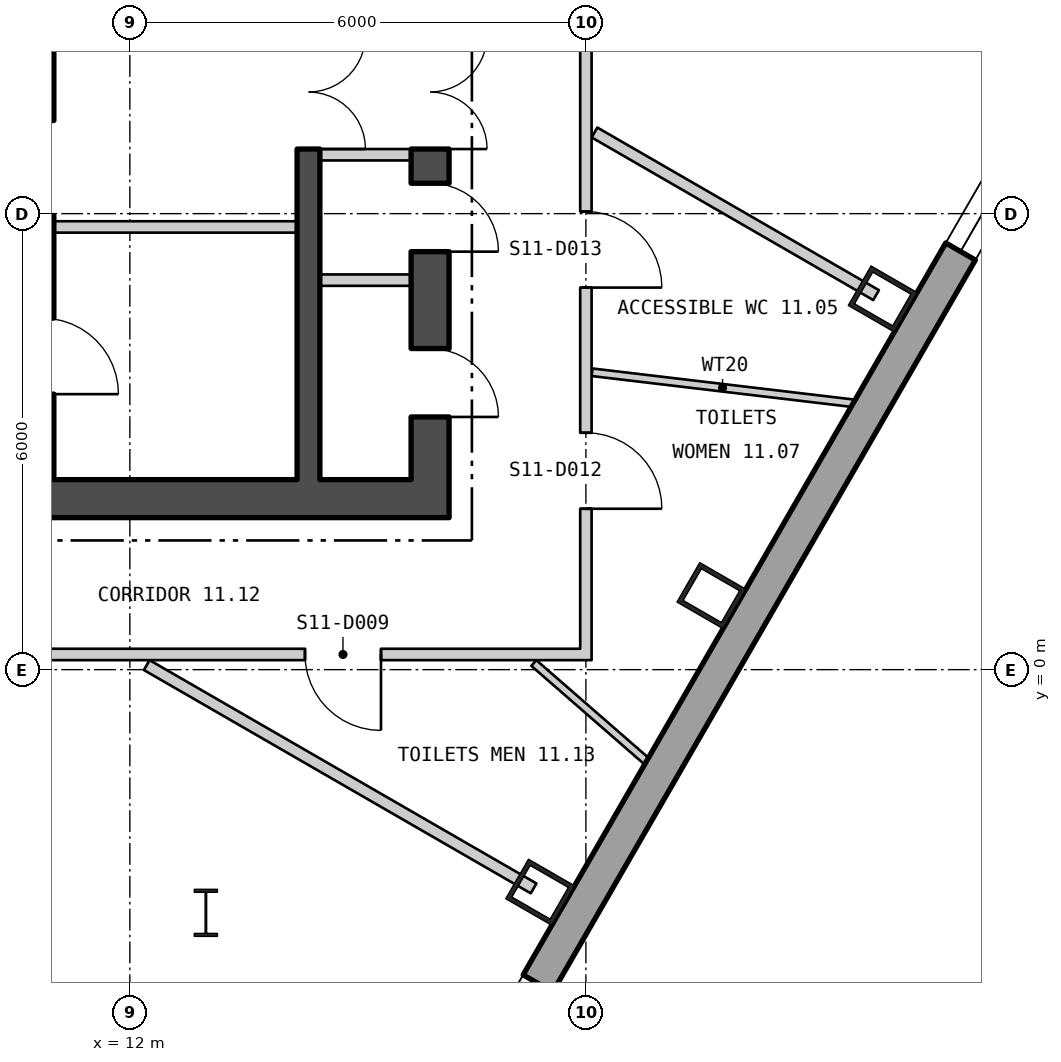
"""IFC4 building model, lengths in metres.
Left out: names, types, materials, properties, quantities, classifications, styles, units other than length and angle.
Written with IfcOpenShell. Run it as: python <this file> out.ifc"""

import sys

from ifc_helpers import new_model, si_unit, direction, frame, frame_2d, origin, origin_2d, place, context, subcontext, project, spatial, polyline, rectangle, hollow_rectangle, i_section, outline, extrude, element, fill, save


model = new_model("IFC4")
c1 = context("Model", 3, precision=1e-05, world=origin(), true_north=direction((0.0, 1.0)))
c2 = subcontext(c1, "Body", "Model", "MODEL_VIEW")
j1 = project(units=[si_unit("LENGTHUNIT", "METRE"), si_unit("PLANEANGLEUNIT", "RADIAN")], contexts=[c1])
p1 = place(None, origin())
s1 = spatial("IfcSite", under=j1, at=p1, CompositionType="ELEMENT")
p2 = place(p1, origin())
s2 = spatial("IfcBuilding", under=s1, at=p2, CompositionType="ELEMENT")
p3 = place(p2, frame((0.0, 0.0, 151.5)))
s3 = spatial("IfcBuildingStorey", under=s2, at=p3, CompositionType="ELEMENT", Elevation=151.5)
for number, where, z_axis, x_axis in (
    (1, (17.398, -2.929, 0.0), (0.0, 0.0, 1.0), (0.5, 0.866, 0.0)),
    (2, (19.651, 0.974, 0.0), (0.0, 0.0, 1.0), (0.5, 0.866, 0.0)),
    (3, (21.905, 4.877, 0.0), (0.0, 0.0, 1.0), (0.5, 0.866, 0.0)),
):
    element("IfcColumn", number, at=place(p3, frame(where, z_axis=z_axis, x_axis=x_axis)), inside=s3, PredefinedType="COLUMN", context=c2, shape_type="SweptSolid", body=[
        extrude(hollow_rectangle(XDim=0.6, YDim=0.7, WallThickness=0.06, at=origin_2d()), origin(), (0.0, 0.0, 1.0), 3.9),
    ])
p4 = place(p3, frame((13.0, -3.2, 0.0), z_axis=(0.0, 0.0, 1.0), x_axis=(1.0, 0.0, 0.0)))
e4 = element("IfcColumn", 4, at=p4, inside=s3, PredefinedType="COLUMN", context=c2, shape_type="SweptSolid", body=[
    extrude(i_section(OverallWidth=0.305, OverallDepth=0.62, WebThickness=0.021, FlangeThickness=0.04, at=origin_2d()), origin(), (0.0, 0.0, 1.0), 3.9),
])
p5 = place(p3, frame((4.21, -26.921, -0.18), z_axis=(0.0, 0.0, 1.0), x_axis=(0.500000141277, 0.866025322218, 0.0)))
e5 = element("IfcWall", 5, at=p5, inside=s3, PredefinedType="SOLIDWALL", context=c2, shape_type="SweptSolid", body=[
    extrude(outline(polyline([(-0.13, -0.225), (45.86, -0.225), (45.6, 0.225), (0.13, 0.225), (-0.13, -0.225)])), origin(), (0.0, 0.0, 1.0), 3.68),
])
p6 = place(p5, frame((1.424, 0.0, 1.08)))
e6 = element("IfcOpeningElement", 6, at=p6, cuts=e5, PredefinedType="OPENING", context=c2, shape_type="SweptSolid", body=[
    extrude(rectangle(XDim=2.4, YDim=2.0, at=frame_2d((1.2, 1.0))), frame((0.0, 0.235, 0.0), z_axis=(0.0, -1.0, 0.0), x_axis=(1.0, 0.0, 0.0)), (0.0, 0.0, 1.0), 0.47),
])
p7 = place(p5, frame((5.892, 0.0, 1.08)))
e7 = element("IfcOpeningElement", 7, at=p7, cuts=e5, PredefinedType="OPENING", context=c2, shape_type="SweptSolid", body=[
    extrude(rectangle(XDim=2.4, YDim=2.0, at=frame_2d((1.2, 1.0))), frame((0.0, 0.235, 0.0), z_axis=(0.0, -1.0, 0.0), x_axis=(1.0, 0.0, 0.0)), (0.0, 0.0, 1.0), 0.47),
])
p8 = place(p5, frame((10.399, 0.0, 1.08)))
e8 = element("IfcOpeningElement", 8, at=p8, cuts=e5, PredefinedType="OPENING", context=c2, shape_type="SweptSolid", body=[
    extrude(rectangle(XDim=2.4, YDim=2.0, at=frame_2d((1.2, 1.0))), frame((0.0, 0.235, 0.0), z_axis=(0.0, -1.0, 0.0), x_axis=(1.0, 0.0, 0.0)), (0.0, 0.0, 1.0), 0.47),
])
p9 = place(p5, frame((14.905, 0.0, 1.08)))
e9 = element("IfcOpeningElement", 9, at=p9, cuts=e5, PredefinedType="OPENING", context=c2, shape_type="SweptSolid", body=[
    extrude(rectangle(XDim=2.4, YDim=2.0, at=frame_2d((1.2, 1.0))), frame((0.0, 0.235, 0.0), z_axis=(0.0, -1.0, 0.0), x_axis=(1.0, 0.0, 0.0)), (0.0, 0.0, 1.0), 0.47),
])
p10 = place(p5, frame((19.412, 0.0, 1.08)))
e10 = element("IfcOpeningElement", 10, at=p10, cuts=e5, PredefinedType="OPENING", context=c2, shape_type="SweptSolid", body=[
    extrude(rectangle(XDim=2.4, YDim=2.0, at=frame_2d((1.2, 1.0))), frame((0.0, 0.235, 0.0), z_axis=(0.0, -1.0, 0.0), x_axis=(1.0, 0.0, 0.0)), (0.0, 0.0, 1.0), 0.47),
])
p11 = place(p5, frame((23.918, 0.0, 1.08)))
e11 = element("IfcOpeningElement", 11, at=p11, cuts=e5, PredefinedType="OPENING", context=c2, shape_type="SweptSolid", body=[
    extrude(rectangle(XDim=2.4, YDim=2.0, at=frame_2d((1.2, 1.0))), frame((0.0, 0.235, 0.0), z_axis=(0.0, -1.0, 0.0), x_axis=(1.0, 0.0, 0.0)), (0.0, 0.0, 1.0), 0.47),
])
p12 = place(p5, frame((37.438, 0.0, 1.08)))
e12 = element("IfcOpeningElement", 12, at=p12, cuts=e5, PredefinedType="OPENING", context=c2, shape_type="SweptSolid", body=[
    extrude(rectangle(XDim=2.4, YDim=2.0, at=frame_2d((1.2, 1.0))), frame((0.0, 0.235, 0.0), z_axis=(0.0, -1.0, 0.0), x_axis=(1.0, 0.0, 0.0)), (0.0, 0.0, 1.0), 0.47),
])
p13 = place(p5, frame((41.907, 0.0, 1.08)))
e13 = element("IfcOpeningElement", 13, at=p13, cuts=e5, PredefinedType="OPENING", context=c2, shape_type="SweptSolid", body=[
    extrude(rectangle(XDim=2.4, YDim=2.0, at=frame_2d((1.2, 1.0))), frame((0.0, 0.235, 0.0), z_axis=(0.0, -1.0, 0.0), x_axis=(1.0, 0.0, 0.0)), (0.0, 0.0, 1.0), 0.47),
])
p14 = place(p3, frame((-16.2, 2.25, 0.0), z_axis=(0.0, 0.0, 1.0), x_axis=(1.0, 0.0, 0.0)))
e14 = element("IfcWall", 14, at=p14, inside=s3, PredefinedType="SHEAR", context=c2, shape_type="SweptSolid", body=[
    extrude(rectangle(XDim=32.4, YDim=0.5, at=frame_2d((16.2, 0.0))), origin(), (0.0, 0.0, 1.0), 3.7),
])
p15 = place(p14, frame((10.7, 0.0, 0.0)))
e15 = element("IfcOpeningElement", 15, at=p15, cuts=e14, PredefinedType="OPENING", context=c2, shape_type="SweptSolid", body=[
    extrude(rectangle(XDim=1.8, YDim=2.4, at=frame_2d((0.9, 1.2))), frame((0.0, 0.26, 0.0), z_axis=(0.0, -1.0, 0.0), x_axis=(1.0, 0.0, 0.0)), (0.0, 0.0, 1.0), 0.52),
])
p16 = place(p14, frame((20.7, 0.0, 0.0)))
e16 = element("IfcOpeningElement", 16, at=p16, cuts=e14, PredefinedType="OPENING", context=c2, shape_type="SweptSolid", body=[
    extrude(rectangle(XDim=1.8, YDim=2.4, at=frame_2d((0.9, 1.2))), frame((0.0, 0.26, 0.0), z_axis=(0.0, -1.0, 0.0), x_axis=(1.0, 0.0, 0.0)), (0.0, 0.0, 1.0), 0.52),
])
p17 = place(p3, frame((15.95, 2.5, 0.0), z_axis=(0.0, 0.0, 1.0), x_axis=(0.0, 1.0, 0.0)))
e17 = element("IfcWall", 17, at=p17, inside=s3, PredefinedType="SHEAR", context=c2, shape_type="SweptSolid", body=[
    extrude(rectangle(XDim=15.0, YDim=0.5, at=frame_2d((7.5, 0.0))), origin(), (0.0, 0.0, 1.0), 3.7),
])
p18 = place(p17, frame((4.35, 0.0, 0.0)))
e18 = element("IfcOpeningElement", 18, at=p18, cuts=e17, PredefinedType="OPENING", context=c2, shape_type="SweptSolid", body=[
    extrude(rectangle(XDim=1.5, YDim=2.1, at=frame_2d((0.75, 1.05))), frame((0.0, 0.26, 0.0), z_axis=(0.0, -1.0, 0.0), x_axis=(1.0, 0.0, 0.0)), (0.0, 0.0, 1.0), 0.52),
])
p19 = place(p17, frame((0.825, 0.0, 0.0)))
e19 = element("IfcOpeningElement", 19, at=p19, cuts=e17, PredefinedType="OPENING", context=c2, shape_type="SweptSolid", body=[
    extrude(rectangle(XDim=0.9, YDim=2.1, at=frame_2d((0.45, 1.05))), frame((0.0, 0.26, 0.0), z_axis=(0.0, -1.0, 0.0), x_axis=(1.0, 0.0, 0.0)), (0.0, 0.0, 1.0), 0.52),
])
p20 = place(p17, frame((3.0, 0.0, 0.0)))
e20 = element("IfcOpeningElement", 20, at=p20, cuts=e17, PredefinedType="OPENING", context=c2, shape_type="SweptSolid", body=[
    extrude(rectangle(XDim=0.9, YDim=2.1, at=frame_2d((0.45, 1.05))), frame((0.0, 0.26, 0.0), z_axis=(0.0, -1.0, 0.0), x_axis=(1.0, 0.0, 0.0)), (0.0, 0.0, 1.0), 0.52),
])
p21 = place(p17, frame((6.59, 0.0, 0.0)))
e21 = element("IfcOpeningElement", 21, at=p21, cuts=e17, PredefinedType="OPENING", context=c2, shape_type="SweptSolid", body=[
    extrude(rectangle(XDim=1.0, YDim=2.1, at=frame_2d((0.5, 1.05))), frame((0.0, 0.26, 0.0), z_axis=(0.0, -1.0, 0.0), x_axis=(1.0, 0.0, 0.0)), (0.0, 0.0, 1.0), 0.52),
])
p22 = place(p17, frame((11.215, 0.0, 0.0)))
e22 = element("IfcOpeningElement", 22, at=p22, cuts=e17, PredefinedType="OPENING", context=c2, shape_type="SweptSolid", body=[
    extrude(rectangle(XDim=0.9, YDim=2.1, at=frame_2d((0.45, 1.05))), frame((0.0, 0.26, 0.0), z_axis=(0.0, -1.0, 0.0), x_axis=(1.0, 0.0, 0.0)), (0.0, 0.0, 1.0), 0.52),
])
p23 = place(p3, frame((10.85, 2.5, 0.0), z_axis=(0.0, 0.0, 1.0), x_axis=(0.0, 1.0, 0.0)))
e23 = element("IfcWall", 23, at=p23, inside=s3, PredefinedType="SHEAR", context=c2, shape_type="SweptSolid", body=[
    extrude(rectangle(XDim=15.0, YDim=0.3, at=frame_2d((7.5, 0.0))), origin(), (0.0, 0.0, 1.0), 3.7),
])
p24 = place(p23, frame((3.475, 0.0, 0.0)))
e24 = element("IfcOpeningElement", 24, at=p24, cuts=e23, PredefinedType="OPENING", context=c2, shape_type="SweptSolid", body=[
    extrude(rectangle(XDim=1.25, YDim=2.1, at=frame_2d((0.625, 1.05))), frame((0.0, 0.16, 0.0), z_axis=(0.0, -1.0, 0.0), x_axis=(1.0, 0.0, 0.0)), (0.0, 0.0, 1.0), 0.32),
])
p25 = place(p23, frame((1.125, 0.0, 0.0)))
e25 = element("IfcOpeningElement", 25, at=p25, cuts=e23, PredefinedType="OPENING", context=c2, shape_type="SweptSolid", body=[
    extrude(rectangle(XDim=1.0, YDim=2.1, at=frame_2d((0.5, 1.05))), frame((0.0, 0.16, 0.0), z_axis=(0.0, -1.0, 0.0), x_axis=(1.0, 0.0, 0.0)), (0.0, 0.0, 1.0), 0.32),
])
p26 = place(p3, frame((14.35, 2.5, 0.0), z_axis=(0.0, 0.0, 1.0), x_axis=(0.0, 1.0, 0.0)))
e26 = element("IfcWall", 26, at=p26, inside=s3, PredefinedType="SHEAR", context=c2, shape_type="SweptSolid", body=[
    extrude(rectangle(XDim=15.0, YDim=0.3, at=frame_2d((7.5, 0.0))), origin(), (0.0, 0.0, 1.0), 3.7),
])
p27 = place(p26, frame((4.35, 0.0, 0.0)))
e27 = element("IfcOpeningElement", 27, at=p27, cuts=e26, PredefinedType="OPENING", context=c2, shape_type="SweptSolid", body=[
    extrude(rectangle(XDim=1.5, YDim=2.1, at=frame_2d((0.75, 1.05))), frame((0.0, 0.16, 0.0), z_axis=(0.0, -1.0, 0.0), x_axis=(1.0, 0.0, 0.0)), (0.0, 0.0, 1.0), 0.32),
])
p28 = place(p3, frame((11.0, 5.825, 0.0), z_axis=(0.0, 0.0, 1.0), x_axis=(1.0, 0.0, 0.0)))
e28 = element("IfcWall", 28, at=p28, inside=s3, PredefinedType="PARTITIONING", context=c2, shape_type="SweptSolid", body=[
    extrude(rectangle(XDim=3.2, YDim=0.15, at=frame_2d((1.6, 0.0))), origin(), (0.0, 0.0, 1.0), 3.7),
])
for number, where, z_axis, x_axis in (
    (29, (14.5, 6.775, 0.0), (0.0, 0.0, 1.0), (1.0, 0.0, 0.0)),
    (30, (14.5, 5.125, 0.0), (0.0, 0.0, 1.0), (1.0, 0.0, 0.0)),
):
    element("IfcWall", number, at=place(p3, frame(where, z_axis=z_axis, x_axis=x_axis)), inside=s3, PredefinedType="PARTITIONING", context=c2, shape_type="SweptSolid", body=[
        extrude(rectangle(XDim=1.2, YDim=0.15, at=frame_2d((0.6, 0.0))), origin(), (0.0, 0.0, 1.0), 3.7),
    ])
p29 = place(p3, frame((7.17, 0.2, 0.0), z_axis=(0.0, 0.0, 1.0), x_axis=(1.0, 0.0, 0.0)))
e31 = element("IfcWall", 31, at=p29, inside=s3, PredefinedType="PARTITIONING", context=c2, shape_type="SweptSolid", body=[
    extrude(rectangle(XDim=10.755, YDim=0.15, at=frame_2d((5.378, 0.0))), origin(), (0.0, 0.0, 1.0), 3.7),
])
p30 = place(p29, frame((7.134, 0.0, 0.0)))
e32 = element("IfcOpeningElement", 32, at=p30, cuts=e31, PredefinedType="OPENING", context=c2, shape_type="SweptSolid", body=[
    extrude(rectangle(XDim=1.0, YDim=2.1, at=frame_2d((0.5, 1.05))), frame((0.0, 0.085, 0.0), z_axis=(0.0, -1.0, 0.0), x_axis=(1.0, 0.0, 0.0)), (0.0, 0.0, 1.0), 0.17),
])
p31 = place(p3, frame((12.222, 0.06, 0.0), z_axis=(0.0, 0.0, 1.0), x_axis=(0.866077922096, -0.499909024581, 0.0)))
e33 = element("IfcWall", 33, at=p31, inside=s3, PredefinedType="PARTITIONING", context=c2, shape_type="SweptSolid", body=[
    extrude(rectangle(XDim=5.877, YDim=0.15, at=frame_2d((2.939, 0.0))), origin(), (0.0, 0.0, 1.0), 3.7),
])
p32 = place(p3, frame((17.315, 0.087, 0.0), z_axis=(0.0, 0.0, 1.0), x_axis=(0.754244081951, -0.656594140121, 0.0)))
e34 = element("IfcWall", 34, at=p32, inside=s3, PredefinedType="PARTITIONING", context=c2, shape_type="SweptSolid", body=[
    extrude(rectangle(XDim=1.966, YDim=0.1, at=frame_2d((0.983, 0.0))), origin(), (0.0, 0.0, 1.0), 3.7),
])
p33 = place(p3, frame((18.0, 0.125, 0.0), z_axis=(0.0, 0.0, 1.0), x_axis=(0.0, 1.0, 0.0)))
e35 = element("IfcWall", 35, at=p33, inside=s3, PredefinedType="PARTITIONING", context=c2, shape_type="SweptSolid", body=[
    extrude(rectangle(XDim=12.179, YDim=0.15, at=frame_2d((6.09, 0.0))), origin(), (0.0, 0.0, 1.0), 3.7),
])
p34 = place(p33, frame((1.992, 0.0, 0.0)))
e36 = element("IfcOpeningElement", 36, at=p34, cuts=e35, PredefinedType="OPENING", context=c2, shape_type="SweptSolid", body=[
    extrude(rectangle(XDim=1.0, YDim=2.1, at=frame_2d((0.5, 1.05))), frame((0.0, 0.085, 0.0), z_axis=(0.0, -1.0, 0.0), x_axis=(1.0, 0.0, 0.0)), (0.0, 0.0, 1.0), 0.17),
])
p35 = place(p33, frame((4.902, 0.0, 0.0)))
e37 = element("IfcOpeningElement", 37, at=p35, cuts=e35, PredefinedType="OPENING", context=c2, shape_type="SweptSolid", body=[
    extrude(rectangle(XDim=1.0, YDim=2.1, at=frame_2d((0.5, 1.05))), frame((0.0, 0.085, 0.0), z_axis=(0.0, -1.0, 0.0), x_axis=(1.0, 0.0, 0.0)), (0.0, 0.0, 1.0), 0.17),
])
p36 = place(p3, frame((18.081, 3.913, 0.0), z_axis=(0.0, 0.0, 1.0), x_axis=(0.993015725956, -0.11798206645, 0.0)))
e38 = element("IfcWall", 38, at=p36, inside=s3, PredefinedType="PARTITIONING", context=c2, shape_type="SweptSolid", body=[
    extrude(rectangle(XDim=3.458, YDim=0.1, at=frame_2d((1.729, 0.0))), origin(), (0.0, 0.0, 1.0), 3.7),
])
p37 = place(p3, frame((18.113, 7.068, 0.0), z_axis=(0.0, 0.0, 1.0), x_axis=(0.865932559475, -0.500160776593, 0.0)))
e39 = element("IfcWall", 39, at=p37, inside=s3, PredefinedType="PARTITIONING", context=c2, shape_type="SweptSolid", body=[
    extrude(rectangle(XDim=4.279, YDim=0.15, at=frame_2d((2.139, 0.0))), origin(), (0.0, 0.0, 1.0), 3.7),
])
p38 = place(p11, origin())
e40 = element("IfcWindow", 40, at=p38, inside=s3, PartitioningType="SINGLE_PANEL", PredefinedType="WINDOW", context=c2, shape_type="SweptSolid", body=[
    extrude(rectangle(XDim=2.4, YDim=2.0, at=frame_2d((1.2, 1.0))), frame((0.0, 0.105, 0.0), z_axis=(0.0, -1.0, 0.0), x_axis=(1.0, 0.0, 0.0)), (0.0, 0.0, 1.0), 0.06),
])
fill(e11, e40)
p39 = place(p12, origin())
e41 = element("IfcWindow", 41, at=p39, inside=s3, PartitioningType="SINGLE_PANEL", PredefinedType="WINDOW", context=c2, shape_type="SweptSolid", body=[
    extrude(rectangle(XDim=2.4, YDim=2.0, at=frame_2d((1.2, 1.0))), frame((0.0, 0.105, 0.0), z_axis=(0.0, -1.0, 0.0), x_axis=(1.0, 0.0, 0.0)), (0.0, 0.0, 1.0), 0.06),
])
fill(e12, e41)
p40 = place(p27, origin())
e42 = element("IfcDoor", 42, at=p40, inside=s3, OperationType="DOUBLE_DOOR_SINGLE_SWING", PredefinedType="DOOR", context=c2, shape_type="SweptSolid", body=[
    extrude(rectangle(XDim=1.5, YDim=2.1, at=frame_2d((0.75, 1.05))), frame((0.0, 0.025, 0.0), z_axis=(0.0, -1.0, 0.0), x_axis=(1.0, 0.0, 0.0)), (0.0, 0.0, 1.0), 0.05),
])
fill(e27, e42)
p41 = place(p18, origin())
e43 = element("IfcDoor", 43, at=p41, inside=s3, OperationType="DOUBLE_DOOR_SINGLE_SWING", PredefinedType="DOOR", context=c2, shape_type="SweptSolid", body=[
    extrude(rectangle(XDim=1.5, YDim=2.1, at=frame_2d((0.75, 1.05))), frame((0.0, 0.025, 0.0), z_axis=(0.0, -1.0, 0.0), x_axis=(1.0, 0.0, 0.0)), (0.0, 0.0, 1.0), 0.05),
])
fill(e18, e43)
p42 = place(p19, origin())
e44 = element("IfcDoor", 44, at=p42, inside=s3, OperationType="SINGLE_SWING_LEFT", PredefinedType="DOOR", context=c2, shape_type="SweptSolid", body=[
    extrude(rectangle(XDim=0.9, YDim=2.1, at=frame_2d((0.45, 1.05))), frame((0.0, 0.025, 0.0), z_axis=(0.0, -1.0, 0.0), x_axis=(1.0, 0.0, 0.0)), (0.0, 0.0, 1.0), 0.05),
])
fill(e19, e44)
p43 = place(p20, origin())
e45 = element("IfcDoor", 45, at=p43, inside=s3, OperationType="SINGLE_SWING_LEFT", PredefinedType="DOOR", context=c2, shape_type="SweptSolid", body=[
    extrude(rectangle(XDim=0.9, YDim=2.1, at=frame_2d((0.45, 1.05))), frame((0.0, 0.025, 0.0), z_axis=(0.0, -1.0, 0.0), x_axis=(1.0, 0.0, 0.0)), (0.0, 0.0, 1.0), 0.05),
])
fill(e20, e45)
p44 = place(p30, origin())
e46 = element("IfcDoor", 46, at=p44, inside=s3, OperationType="SINGLE_SWING_RIGHT", PredefinedType="DOOR", context=c2, shape_type="SweptSolid", body=[
    extrude(rectangle(XDim=1.0, YDim=2.1, at=frame_2d((0.5, 1.05))), frame((0.0, 0.025, 0.0), z_axis=(0.0, -1.0, 0.0), x_axis=(1.0, 0.0, 0.0)), (0.0, 0.0, 1.0), 0.05),
])
fill(e32, e46)
p45 = place(p34, origin())
e47 = element("IfcDoor", 47, at=p45, inside=s3, OperationType="SINGLE_SWING_LEFT", PredefinedType="DOOR", context=c2, shape_type="SweptSolid", body=[
    extrude(rectangle(XDim=1.0, YDim=2.1, at=frame_2d((0.5, 1.05))), frame((0.0, 0.025, 0.0), z_axis=(0.0, -1.0, 0.0), x_axis=(1.0, 0.0, 0.0)), (0.0, 0.0, 1.0), 0.05),
])
fill(e36, e47)
p46 = place(p35, origin())
e48 = element("IfcDoor", 48, at=p46, inside=s3, OperationType="SINGLE_SWING_LEFT", PredefinedType="DOOR", context=c2, shape_type="SweptSolid", body=[
    extrude(rectangle(XDim=1.0, YDim=2.1, at=frame_2d((0.5, 1.05))), frame((0.0, 0.025, 0.0), z_axis=(0.0, -1.0, 0.0), x_axis=(1.0, 0.0, 0.0)), (0.0, 0.0, 1.0), 0.05),
])
fill(e37, e48)
save(model, sys.argv[1])
